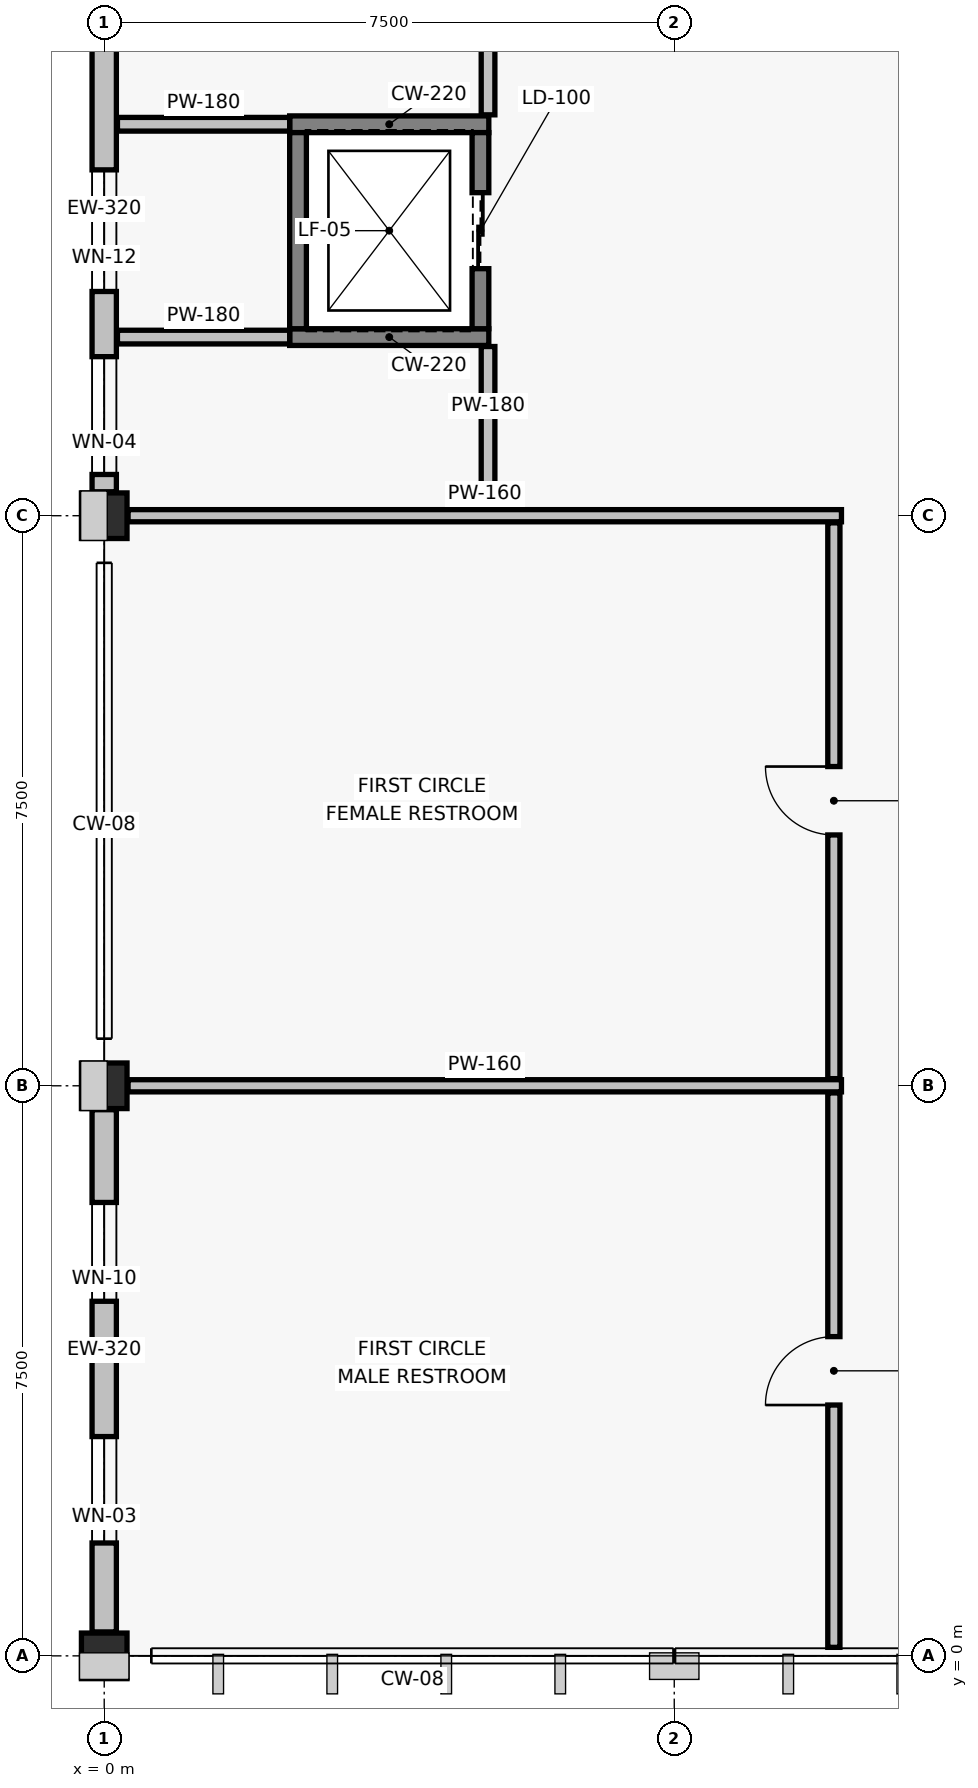
"""IFC4 building model, lengths in metres.
Left out: names, types, materials, properties, quantities, classifications, styles, units other than length and angle.
Written with IfcOpenShell. Run it as: python <this file> out.ifc"""

import sys

from ifc_helpers import new_model, si_unit, direction, frame, frame_2d, origin, origin_2d, place, context, subcontext, project, spatial, rectangle, extrude, element, fill, save


model = new_model("IFC4")
c1 = context("Model", 3, precision=1e-05, world=origin(), true_north=direction((0.0, 1.0)))
c2 = subcontext(c1, "Body", "Model", "MODEL_VIEW")
j1 = project(units=[si_unit("LENGTHUNIT", "METRE"), si_unit("PLANEANGLEUNIT", "RADIAN")], contexts=[c1])
p1 = place(None, origin())
s1 = spatial("IfcSite", under=j1, at=p1, CompositionType="ELEMENT")
p2 = place(p1, origin())
s2 = spatial("IfcBuilding", under=s1, at=p2, CompositionType="ELEMENT")
p3 = place(p2, frame((0.0, 0.0, 9.0)))
s3 = spatial("IfcBuildingStorey", under=s2, at=p3, CompositionType="ELEMENT", Elevation=9.0)
for number, where, z_axis, x_axis in (
    (1, (0.0, 0.0, 0.0), (0.0, 0.0, 1.0), (1.0, 0.0, 0.0)),
    (2, (0.0, 7.5, 0.0), (0.0, 0.0, 1.0), (1.0, 0.0, 0.0)),
    (3, (0.0, 15.0, 0.0), (0.0, 0.0, 1.0), (1.0, 0.0, 0.0)),
):
    element("IfcColumn", number, at=place(p3, frame(where, z_axis=z_axis, x_axis=x_axis)), inside=s3, PredefinedType="COLUMN", context=c2, shape_type="SweptSolid", body=[
        extrude(rectangle(XDim=0.6, YDim=0.6, at=origin_2d()), origin(), (0.0, 0.0, 1.0), 4.2),
    ])
p4 = place(p3, frame((0.0, 0.315, 0.0), z_axis=(0.0, 0.0, 1.0), x_axis=(0.0, 1.0, 0.0)))
e4 = element("IfcWall", 4, at=p4, inside=s3, PredefinedType="SOLIDWALL", context=c2, shape_type="SweptSolid", body=[
    extrude(rectangle(XDim=6.87, YDim=0.32, at=frame_2d((3.435, 0.0))), origin(), (0.0, 0.0, 1.0), 2.87),
])
p5 = place(p4, frame((1.17, 0.0, 0.6)))
e5 = element("IfcOpeningElement", 5, at=p5, cuts=e4, PredefinedType="OPENING", context=c2, shape_type="SweptSolid", body=[
    extrude(rectangle(XDim=1.4, YDim=1.8, at=frame_2d((0.7, 0.9))), frame((0.0, 0.17, 0.0), z_axis=(0.0, -1.0, 0.0), x_axis=(1.0, 0.0, 0.0)), (0.0, 0.0, 1.0), 0.34),
])
p6 = place(p4, frame((4.35, 0.0, 0.6)))
e6 = element("IfcOpeningElement", 6, at=p6, cuts=e4, PredefinedType="OPENING", context=c2, shape_type="SweptSolid", body=[
    extrude(rectangle(XDim=1.3, YDim=1.3, at=frame_2d((0.65, 0.65))), frame((0.0, 0.17, 0.0), z_axis=(0.0, -1.0, 0.0), x_axis=(1.0, 0.0, 0.0)), (0.0, 0.0, 1.0), 0.34),
])
p7 = place(p3, frame((0.0, 15.315, 0.0), z_axis=(0.0, 0.0, 1.0), x_axis=(0.0, 1.0, 0.0)))
e7 = element("IfcWall", 7, at=p7, inside=s3, PredefinedType="SOLIDWALL", context=c2, shape_type="SweptSolid", body=[
    extrude(rectangle(XDim=6.87, YDim=0.32, at=frame_2d((3.435, 0.0))), origin(), (0.0, 0.0, 1.0), 2.87),
])
p8 = place(p7, frame((0.228, 0.0, 0.6)))
e8 = element("IfcOpeningElement", 8, at=p8, cuts=e7, PredefinedType="OPENING", context=c2, shape_type="SweptSolid", body=[
    extrude(rectangle(XDim=1.55, YDim=1.8, at=frame_2d((0.775, 0.9))), frame((0.0, 0.17, 0.0), z_axis=(0.0, -1.0, 0.0), x_axis=(1.0, 0.0, 0.0)), (0.0, 0.0, 1.0), 0.34),
])
p9 = place(p7, frame((2.635, 0.0, 0.6)))
e9 = element("IfcOpeningElement", 9, at=p9, cuts=e7, PredefinedType="OPENING", context=c2, shape_type="SweptSolid", body=[
    extrude(rectangle(XDim=1.6, YDim=1.3, at=frame_2d((0.8, 0.65))), frame((0.0, 0.17, 0.0), z_axis=(0.0, -1.0, 0.0), x_axis=(1.0, 0.0, 0.0)), (0.0, 0.0, 1.0), 0.34),
])
for number, where, z_axis, x_axis in (
    (10, (2.44, 17.35, 0.0), (0.0, 0.0, 1.0), (1.0, 0.0, 0.0)),
    (11, (2.44, 20.15, 0.0), (0.0, 0.0, 1.0), (1.0, 0.0, 0.0)),
):
    element("IfcWall", number, at=place(p3, frame(where, z_axis=z_axis, x_axis=x_axis)), inside=s3, PredefinedType="SOLIDWALL", context=c2, shape_type="SweptSolid", body=[
        extrude(rectangle(XDim=2.62, YDim=0.22, at=frame_2d((1.31, 0.0))), origin(), (0.0, 0.0, 1.0), 3.92),
    ])
p10 = place(p3, frame((2.55, 17.46, 0.0), z_axis=(0.0, 0.0, 1.0), x_axis=(0.0, 1.0, 0.0)))
e12 = element("IfcWall", 12, at=p10, inside=s3, PredefinedType="SOLIDWALL", context=c2, shape_type="SweptSolid", body=[
    extrude(rectangle(XDim=2.58, YDim=0.22, at=frame_2d((1.29, 0.0))), origin(), (0.0, 0.0, 1.0), 3.92),
])
p11 = place(p3, frame((4.95, 17.46, 0.0), z_axis=(0.0, 0.0, 1.0), x_axis=(0.0, 1.0, 0.0)))
e13 = element("IfcWall", 13, at=p11, inside=s3, PredefinedType="SOLIDWALL", context=c2, shape_type="SweptSolid", body=[
    extrude(rectangle(XDim=2.58, YDim=0.22, at=frame_2d((1.29, 0.0))), origin(), (0.0, 0.0, 1.0), 3.92),
])
p12 = place(p11, frame((0.79, 0.0, 0.0)))
e14 = element("IfcOpeningElement", 14, at=p12, cuts=e13, PredefinedType="OPENING", context=c2, shape_type="SweptSolid", body=[
    extrude(rectangle(XDim=1.0, YDim=2.15, at=frame_2d((0.5, 1.075))), frame((0.0, 0.12, 0.0), z_axis=(0.0, -1.0, 0.0), x_axis=(1.0, 0.0, 0.0)), (0.0, 0.0, 1.0), 0.24),
])
for number, where, z_axis, x_axis in (
    (15, (0.314, 7.5, 0.0), (0.0, 0.0, 1.0), (1.0, 0.0, 0.0)),
    (16, (0.314, 15.0, 0.0), (0.0, 0.0, 1.0), (1.0, 0.0, 0.0)),
):
    element("IfcWall", number, at=place(p3, frame(where, z_axis=z_axis, x_axis=x_axis)), inside=s3, PredefinedType="PARTITIONING", context=c2, shape_type="SweptSolid", body=[
        extrude(rectangle(XDim=9.386, YDim=0.16, at=frame_2d((4.693, 0.0))), origin(), (0.0, 0.0, 1.0), 2.87),
    ])
p13 = place(p3, frame((9.6, 0.112, 0.0), z_axis=(0.0, 0.0, 1.0), x_axis=(0.0, 1.0, 0.0)))
e17 = element("IfcWall", 17, at=p13, inside=s3, PredefinedType="PARTITIONING", context=c2, shape_type="SweptSolid", body=[
    extrude(rectangle(XDim=7.294, YDim=0.16, at=frame_2d((3.647, 0.0))), origin(), (0.0, 0.0, 1.0), 2.87),
])
p14 = place(p13, frame((3.188, 0.0, 0.0)))
e18 = element("IfcOpeningElement", 18, at=p14, cuts=e17, PredefinedType="OPENING", context=c2, shape_type="SweptSolid", body=[
    extrude(rectangle(XDim=0.9, YDim=2.1, at=frame_2d((0.45, 1.05))), frame((0.0, 0.09, 0.0), z_axis=(0.0, -1.0, 0.0), x_axis=(1.0, 0.0, 0.0)), (0.0, 0.0, 1.0), 0.18),
])
p15 = place(p3, frame((9.6, 7.594, 0.0), z_axis=(0.0, 0.0, 1.0), x_axis=(0.0, 1.0, 0.0)))
e19 = element("IfcWall", 19, at=p15, inside=s3, PredefinedType="PARTITIONING", context=c2, shape_type="SweptSolid", body=[
    extrude(rectangle(XDim=7.312, YDim=0.16, at=frame_2d((3.656, 0.0))), origin(), (0.0, 0.0, 1.0), 2.87),
])
p16 = place(p15, frame((3.206, 0.0, 0.0)))
e20 = element("IfcOpeningElement", 20, at=p16, cuts=e19, PredefinedType="OPENING", context=c2, shape_type="SweptSolid", body=[
    extrude(rectangle(XDim=0.9, YDim=2.1, at=frame_2d((0.45, 1.05))), frame((0.0, 0.09, 0.0), z_axis=(0.0, -1.0, 0.0), x_axis=(1.0, 0.0, 0.0)), (0.0, 0.0, 1.0), 0.18),
])
for number, where, z_axis, x_axis in (
    (21, (0.174, 17.35, 0.0), (0.0, 0.0, 1.0), (1.0, 0.0, 0.0)),
    (22, (0.174, 20.15, 0.0), (0.0, 0.0, 1.0), (1.0, 0.0, 0.0)),
):
    element("IfcWall", number, at=place(p3, frame(where, z_axis=z_axis, x_axis=x_axis)), inside=s3, PredefinedType="PARTITIONING", context=c2, shape_type="SweptSolid", body=[
        extrude(rectangle(XDim=2.266, YDim=0.18, at=frame_2d((1.133, 0.0))), origin(), (0.0, 0.0, 1.0), 3.27),
    ])
p17 = place(p3, frame((5.05, 15.094, 0.0), z_axis=(0.0, 0.0, 1.0), x_axis=(0.0, 1.0, 0.0)))
e23 = element("IfcWall", 23, at=p17, inside=s3, PredefinedType="PARTITIONING", context=c2, shape_type="SweptSolid", body=[
    extrude(rectangle(XDim=2.132, YDim=0.18, at=frame_2d((1.066, 0.0))), origin(), (0.0, 0.0, 1.0), 2.87),
])
p18 = place(p3, frame((5.05, 20.274, 0.0), z_axis=(0.0, 0.0, 1.0), x_axis=(0.0, 1.0, 0.0)))
e24 = element("IfcWall", 24, at=p18, inside=s3, PredefinedType="PARTITIONING", context=c2, shape_type="SweptSolid", body=[
    extrude(rectangle(XDim=3.462, YDim=0.18, at=frame_2d((1.731, 0.0))), origin(), (0.0, 0.0, 1.0), 2.87),
])
p19 = place(p5, origin())
e25 = element("IfcWindow", 25, at=p19, inside=s3, PartitioningType="SINGLE_PANEL", PredefinedType="WINDOW", context=c2, shape_type="SweptSolid", body=[
    extrude(rectangle(XDim=1.4, YDim=1.8, at=frame_2d((0.7, 0.9))), frame((0.0, 0.03, 0.0), z_axis=(0.0, -1.0, 0.0), x_axis=(1.0, 0.0, 0.0)), (0.0, 0.0, 1.0), 0.06),
])
fill(e5, e25)
p20 = place(p6, origin())
e26 = element("IfcWindow", 26, at=p20, inside=s3, PartitioningType="SINGLE_PANEL", PredefinedType="WINDOW", context=c2, shape_type="SweptSolid", body=[
    extrude(rectangle(XDim=1.3, YDim=1.3, at=frame_2d((0.65, 0.65))), frame((0.0, 0.03, 0.0), z_axis=(0.0, -1.0, 0.0), x_axis=(1.0, 0.0, 0.0)), (0.0, 0.0, 1.0), 0.06),
])
fill(e6, e26)
p21 = place(p8, origin())
e27 = element("IfcWindow", 27, at=p21, inside=s3, PartitioningType="SINGLE_PANEL", PredefinedType="WINDOW", context=c2, shape_type="SweptSolid", body=[
    extrude(rectangle(XDim=1.55, YDim=1.8, at=frame_2d((0.775, 0.9))), frame((0.0, 0.03, 0.0), z_axis=(0.0, -1.0, 0.0), x_axis=(1.0, 0.0, 0.0)), (0.0, 0.0, 1.0), 0.06),
])
fill(e8, e27)
p22 = place(p9, origin())
e28 = element("IfcWindow", 28, at=p22, inside=s3, PartitioningType="SINGLE_PANEL", PredefinedType="WINDOW", context=c2, shape_type="SweptSolid", body=[
    extrude(rectangle(XDim=1.6, YDim=1.3, at=frame_2d((0.8, 0.65))), frame((0.0, 0.03, 0.0), z_axis=(0.0, -1.0, 0.0), x_axis=(1.0, 0.0, 0.0)), (0.0, 0.0, 1.0), 0.06),
])
fill(e9, e28)
p23 = place(p12, origin())
e29 = element("IfcDoor", 29, at=p23, inside=s3, OperationType="SLIDING_TO_LEFT", PredefinedType="DOOR", context=c2, shape_type="SweptSolid", body=[
    extrude(rectangle(XDim=1.0, YDim=2.15, at=frame_2d((0.5, 1.075))), frame((0.0, 0.025, 0.0), z_axis=(0.0, -1.0, 0.0), x_axis=(1.0, 0.0, 0.0)), (0.0, 0.0, 1.0), 0.05),
])
fill(e14, e29)
p24 = place(p14, origin())
e30 = element("IfcDoor", 30, at=p24, inside=s3, OperationType="SINGLE_SWING_LEFT", PredefinedType="DOOR", context=c2, shape_type="SweptSolid", body=[
    extrude(rectangle(XDim=0.9, YDim=2.1, at=frame_2d((0.45, 1.05))), frame((0.0, 0.025, 0.0), z_axis=(0.0, -1.0, 0.0), x_axis=(1.0, 0.0, 0.0)), (0.0, 0.0, 1.0), 0.05),
])
fill(e18, e30)
p25 = place(p16, origin())
e31 = element("IfcDoor", 31, at=p25, inside=s3, OperationType="SINGLE_SWING_RIGHT", PredefinedType="DOOR", context=c2, shape_type="SweptSolid", body=[
    extrude(rectangle(XDim=0.9, YDim=2.1, at=frame_2d((0.45, 1.05))), frame((0.0, 0.025, 0.0), z_axis=(0.0, -1.0, 0.0), x_axis=(1.0, 0.0, 0.0)), (0.0, 0.0, 1.0), 0.05),
])
fill(e20, e31)
save(model, sys.argv[1])
